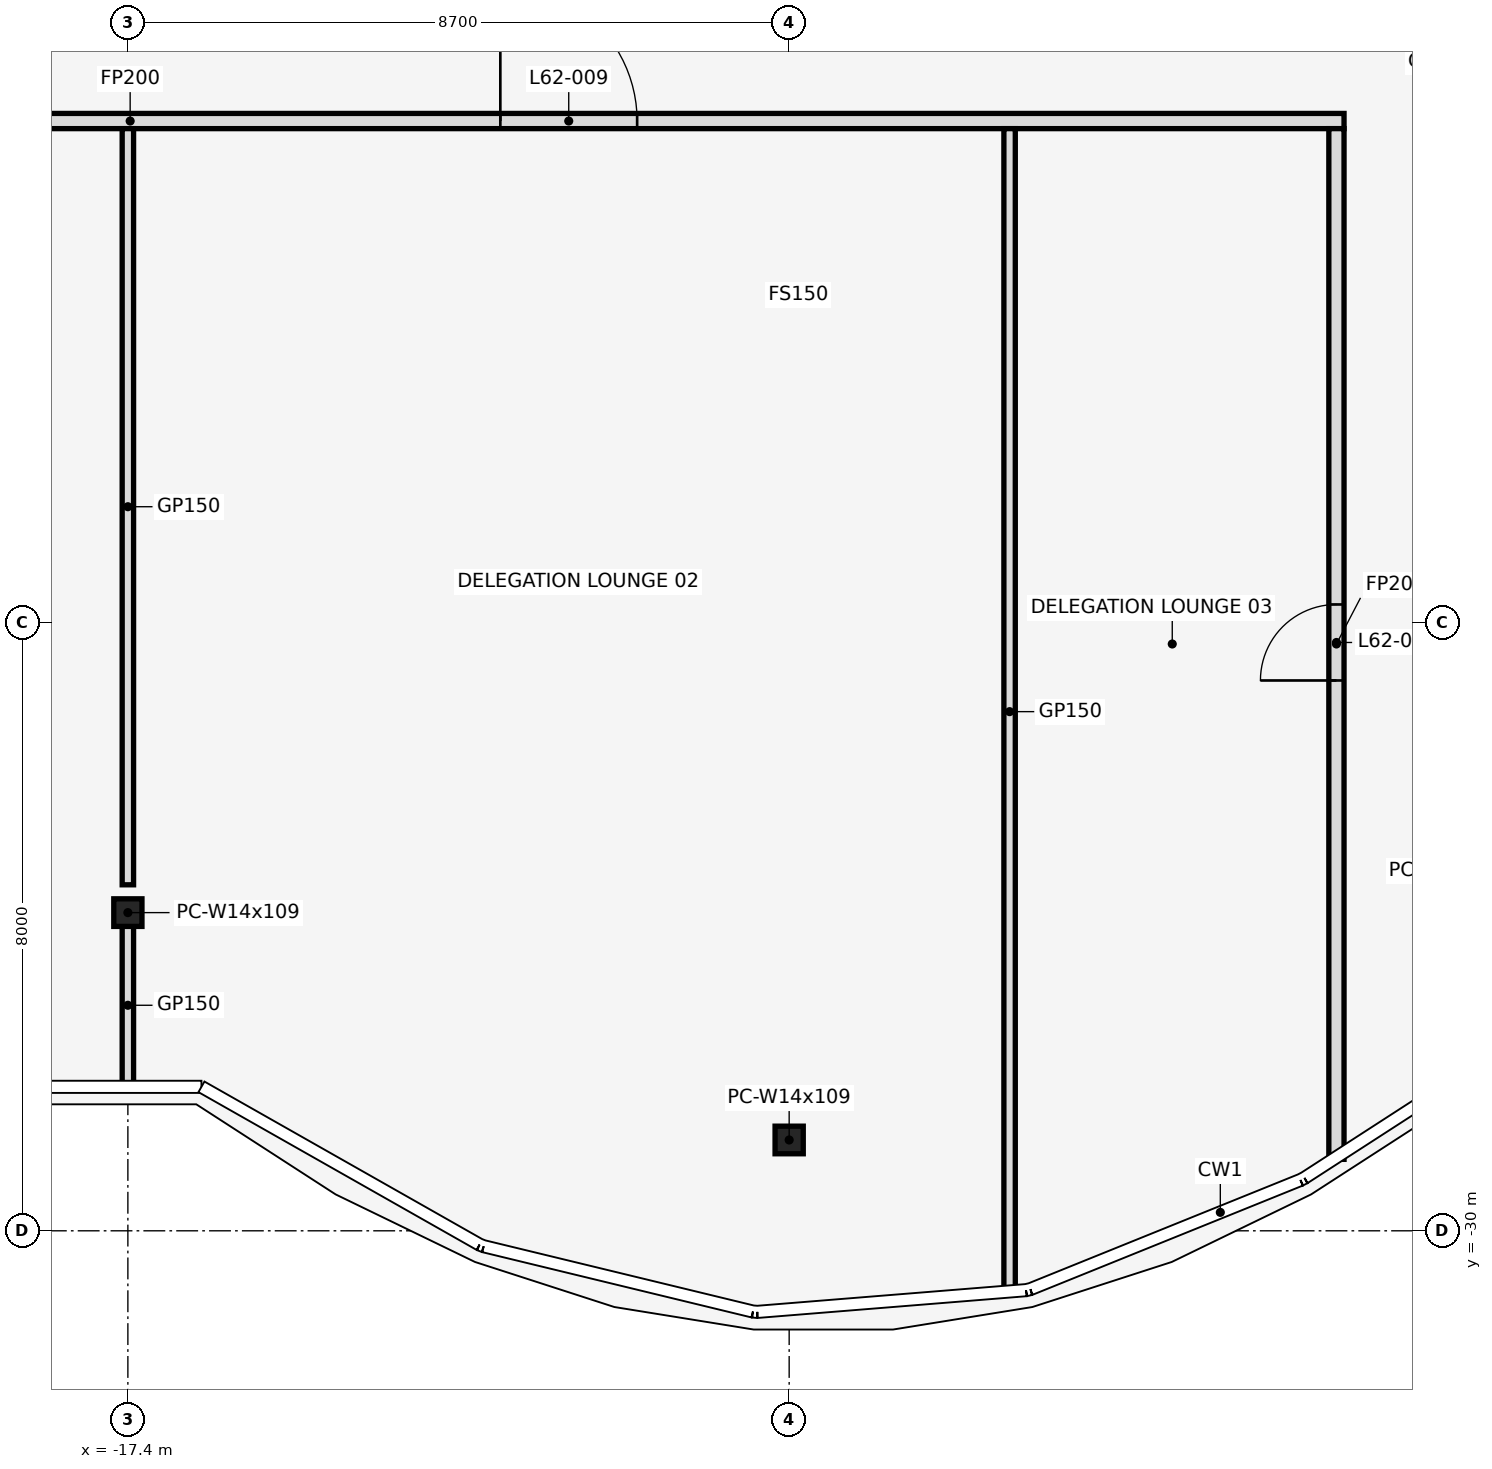
"""IFC4 building model, lengths in metres.
Left out: names, types, materials, properties, quantities, classifications, styles, units other than length and angle.
Written with IfcOpenShell. Run it as: python <this file> out.ifc"""

import sys

from ifc_helpers import new_model, si_unit, direction, frame, frame_2d, origin, origin_2d, place, context, subcontext, project, spatial, rectangle, i_section, extrude, element, fill, save


model = new_model("IFC4")
c1 = context("Model", 3, precision=1e-05, world=origin(), true_north=direction((0.0, 1.0)))
c2 = subcontext(c1, "Body", "Model", "MODEL_VIEW")
j1 = project(units=[si_unit("LENGTHUNIT", "METRE"), si_unit("PLANEANGLEUNIT", "RADIAN")], contexts=[c1])
p1 = place(None, origin())
s1 = spatial("IfcSite", under=j1, at=p1, CompositionType="ELEMENT")
p2 = place(p1, origin())
s2 = spatial("IfcBuilding", under=s1, at=p2, CompositionType="ELEMENT")
p3 = place(p2, frame((0.0, 0.0, 275.0)))
s3 = spatial("IfcBuildingStorey", under=s2, at=p3, CompositionType="ELEMENT", Elevation=275.0)
for number, where, z_axis, x_axis in (
    (1, (-17.4, -25.814, 0.0), (0.0, 0.0, 1.0), (1.0, 0.0, 0.0)),
    (2, (-8.7, -28.805, 0.0), (0.0, 0.0, 1.0), (1.0, 0.0, 0.0)),
):
    element("IfcColumn", number, at=place(p3, frame(where, z_axis=z_axis, x_axis=x_axis)), inside=s3, PredefinedType="COLUMN", context=c2, shape_type="SweptSolid", body=[
        extrude(i_section(OverallWidth=0.371, OverallDepth=0.363, WebThickness=0.013, FlangeThickness=0.022, at=origin_2d()), origin(), (0.0, 0.0, 1.0), 4.2),
    ])
p4 = place(p3, frame((-33.34, -15.4, 0.0), z_axis=(0.0, 0.0, 1.0), x_axis=(1.0, 0.0, 0.0)))
e3 = element("IfcWall", 3, at=p4, inside=s3, PredefinedType="PARTITIONING", context=c2, shape_type="SweptSolid", body=[
    extrude(rectangle(XDim=31.94, YDim=0.2, at=frame_2d((15.97, 0.0))), origin(), (0.0, 0.0, 1.0), 3.118),
])
p5 = place(p4, frame((4.2, 0.0, 0.0)))
e4 = element("IfcOpeningElement", 4, at=p5, cuts=e3, PredefinedType="OPENING", context=c2, shape_type="SweptSolid", body=[
    extrude(rectangle(XDim=1.8, YDim=2.1, at=frame_2d((0.9, 1.05))), frame((0.0, 0.112, 0.0), z_axis=(0.0, -1.0, 0.0), x_axis=(1.0, 0.0, 0.0)), (0.0, 0.0, 1.0), 0.224),
])
p6 = place(p4, frame((12.54, 0.0, 0.0)))
e5 = element("IfcOpeningElement", 5, at=p6, cuts=e3, PredefinedType="OPENING", context=c2, shape_type="SweptSolid", body=[
    extrude(rectangle(XDim=1.0, YDim=2.1, at=frame_2d((0.5, 1.05))), frame((0.0, 0.112, 0.0), z_axis=(0.0, -1.0, 0.0), x_axis=(1.0, 0.0, 0.0)), (0.0, 0.0, 1.0), 0.224),
])
p7 = place(p4, frame((20.84, 0.0, 0.0)))
e6 = element("IfcOpeningElement", 6, at=p7, cuts=e3, PredefinedType="OPENING", context=c2, shape_type="SweptSolid", body=[
    extrude(rectangle(XDim=1.8, YDim=2.1, at=frame_2d((0.9, 1.05))), frame((0.0, 0.112, 0.0), z_axis=(0.0, -1.0, 0.0), x_axis=(1.0, 0.0, 0.0)), (0.0, 0.0, 1.0), 0.224),
])
p8 = place(p3, frame((-17.4, -28.13, 0.0), z_axis=(0.0, 0.0, 1.0), x_axis=(0.0, 1.0, 0.0)))
e7 = element("IfcWall", 7, at=p8, inside=s3, PredefinedType="PARTITIONING", context=c2, shape_type="SweptSolid", body=[
    extrude(rectangle(XDim=2.194, YDim=0.15, at=frame_2d((1.097, 0.0))), origin(), (0.0, 0.0, 1.0), 3.118),
])
p9 = place(p3, frame((-17.4, -25.448, 0.0), z_axis=(0.0, 0.0, 1.0), x_axis=(0.0, 1.0, 0.0)))
e8 = element("IfcWall", 8, at=p9, inside=s3, PredefinedType="PARTITIONING", context=c2, shape_type="SweptSolid", body=[
    extrude(rectangle(XDim=9.948, YDim=0.15, at=frame_2d((4.974, 0.0))), origin(), (0.0, 0.0, 1.0), 3.118),
])
p10 = place(p3, frame((-5.8, -30.84, 0.0), z_axis=(0.0, 0.0, 1.0), x_axis=(0.0, 1.0, 0.0)))
e9 = element("IfcWall", 9, at=p10, inside=s3, PredefinedType="PARTITIONING", context=c2, shape_type="SweptSolid", body=[
    extrude(rectangle(XDim=15.34, YDim=0.15, at=frame_2d((7.67, 0.0))), origin(), (0.0, 0.0, 1.0), 3.118),
])
p11 = place(p3, frame((-1.5, -29.06, 0.0), z_axis=(0.0, 0.0, 1.0), x_axis=(0.0, 1.0, 0.0)))
e10 = element("IfcWall", 10, at=p11, inside=s3, PredefinedType="PARTITIONING", context=c2, shape_type="SweptSolid", body=[
    extrude(rectangle(XDim=13.56, YDim=0.2, at=frame_2d((6.78, 0.0))), origin(), (0.0, 0.0, 1.0), 3.118),
])
p12 = place(p11, frame((6.3, 0.0, 0.0)))
e11 = element("IfcOpeningElement", 11, at=p12, cuts=e10, PredefinedType="OPENING", context=c2, shape_type="SweptSolid", body=[
    extrude(rectangle(XDim=1.0, YDim=2.1, at=frame_2d((0.5, 1.05))), frame((0.0, 0.112, 0.0), z_axis=(0.0, -1.0, 0.0), x_axis=(1.0, 0.0, 0.0)), (0.0, 0.0, 1.0), 0.224),
])
p13 = place(p7, origin())
e12 = element("IfcDoor", 12, at=p13, inside=s3, OperationType="SINGLE_SWING_LEFT", PredefinedType="DOOR", context=c2, shape_type="SweptSolid", body=[
    extrude(rectangle(XDim=1.8, YDim=2.1, at=frame_2d((0.9, 1.05))), frame((0.0, 0.025, 0.0), z_axis=(0.0, -1.0, 0.0), x_axis=(1.0, 0.0, 0.0)), (0.0, 0.0, 1.0), 0.05),
])
fill(e6, e12)
p14 = place(p12, origin())
e13 = element("IfcDoor", 13, at=p14, inside=s3, OperationType="SINGLE_SWING_LEFT", PredefinedType="DOOR", context=c2, shape_type="SweptSolid", body=[
    extrude(rectangle(XDim=1.0, YDim=2.1, at=frame_2d((0.5, 1.05))), frame((0.0, 0.025, 0.0), z_axis=(0.0, -1.0, 0.0), x_axis=(1.0, 0.0, 0.0)), (0.0, 0.0, 1.0), 0.05),
])
fill(e11, e13)
save(model, sys.argv[1])
